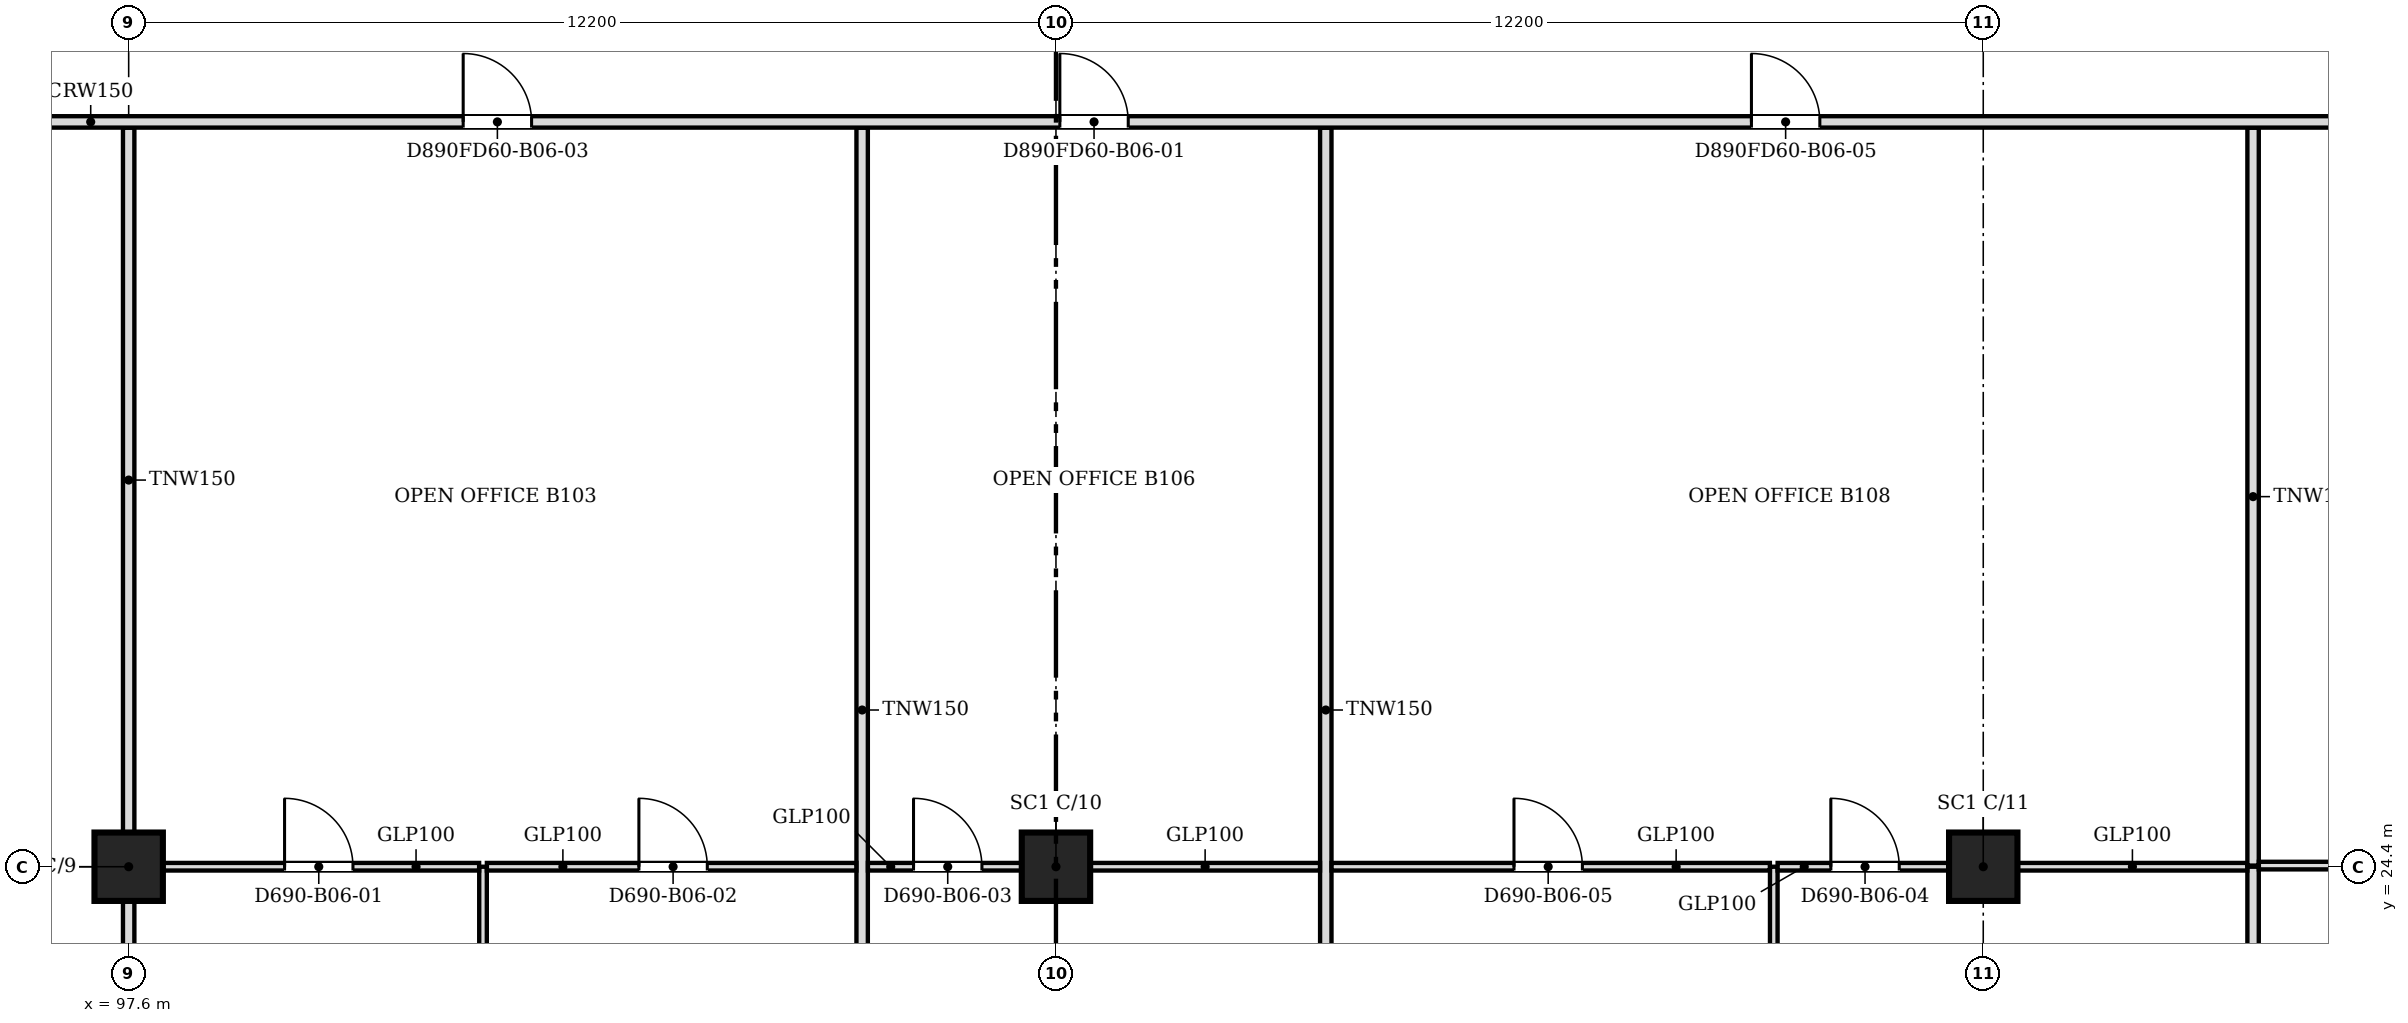
"""IFC4 building model, lengths in metres.
Left out: names, types, materials, properties, quantities, classifications, styles, units other than length and angle.
Written with IfcOpenShell. Run it as: python <this file> out.ifc"""

import sys

from ifc_helpers import new_model, si_unit, direction, frame, frame_2d, origin, origin_2d, place, context, subcontext, project, spatial, rectangle, extrude, source, transform, mapped, element, fill, save


model = new_model("IFC4")
c1 = context("Model", 3, precision=1e-05, world=origin(), true_north=direction((0.0, 1.0)))
c2 = subcontext(c1, "Body", "Model", "MODEL_VIEW")
j1 = project(units=[si_unit("LENGTHUNIT", "METRE"), si_unit("PLANEANGLEUNIT", "RADIAN")], contexts=[c1])
p1 = place(None, origin())
s1 = spatial("IfcSite", under=j1, at=p1, CompositionType="ELEMENT")
p2 = place(p1, origin())
s2 = spatial("IfcBuilding", under=s1, at=p2, CompositionType="ELEMENT")
p3 = place(p2, frame((0.0, 0.0, 60.0)))
s3 = spatial("IfcBuildingStorey", under=s2, at=p3, CompositionType="ELEMENT", Elevation=60.0)
for number, where, z_axis, x_axis in (
    (1, (97.6, 24.4, 0.0), (0.0, 0.0, 1.0), (1.0, 0.0, 0.0)),
    (2, (109.8, 24.4, 0.0), (0.0, 0.0, 1.0), (1.0, 0.0, 0.0)),
    (3, (122.0, 24.4, 0.0), (0.0, 0.0, 1.0), (1.0, 0.0, 0.0)),
):
    element("IfcColumn", number, at=place(p3, frame(where, z_axis=z_axis, x_axis=x_axis)), inside=s3, PredefinedType="COLUMN", context=c2, shape_type="SweptSolid", body=[
        extrude(rectangle(XDim=0.9, YDim=0.9, at=origin_2d()), origin(), (0.0, 0.0, 1.0), 3.5),
    ])
p4 = place(p3, frame((97.6, 18.8, 0.0), z_axis=(0.0, 0.0, 1.0), x_axis=(0.0, 1.0, 0.0)))
e4 = element("IfcWall", 4, at=p4, inside=s3, PredefinedType="PARTITIONING", context=c2, shape_type="SweptSolid", body=[
    extrude(rectangle(XDim=5.149, YDim=0.15, at=frame_2d((2.574, 0.0))), origin(), (0.0, 0.0, 1.0), 2.888),
])
p5 = place(p3, frame((102.262, 18.8, 0.0), z_axis=(0.0, 0.0, 1.0), x_axis=(0.0, 1.0, 0.0)))
e5 = element("IfcWall", 5, at=p5, inside=s3, PredefinedType="PARTITIONING", context=c2, shape_type="SweptSolid", body=[
    extrude(rectangle(XDim=5.6, YDim=0.1, at=frame_2d((2.8, 0.0))), origin(), (0.0, 0.0, 1.0), 2.888),
])
for number, where, z_axis, x_axis in (
    (6, (107.25, 18.8, 0.0), (0.0, 0.0, 1.0), (0.0, 1.0, 0.0)),
    (7, (113.35, 18.8, 0.0), (0.0, 0.0, 1.0), (0.0, 1.0, 0.0)),
):
    element("IfcWall", number, at=place(p3, frame(where, z_axis=z_axis, x_axis=x_axis)), inside=s3, PredefinedType="PARTITIONING", context=c2, shape_type="SweptSolid", body=[
        extrude(rectangle(XDim=15.324, YDim=0.15, at=frame_2d((7.662, 0.0))), origin(), (0.0, 0.0, 1.0), 2.888),
    ])
p6 = place(p3, frame((119.244, 18.8, 0.0), z_axis=(0.0, 0.0, 1.0), x_axis=(0.0, 1.0, 0.0)))
e8 = element("IfcWall", 8, at=p6, inside=s3, PredefinedType="PARTITIONING", context=c2, shape_type="SweptSolid", body=[
    extrude(rectangle(XDim=5.6, YDim=0.1, at=frame_2d((2.8, 0.0))), origin(), (0.0, 0.0, 1.0), 2.888),
])
p7 = place(p3, frame((125.55, 18.8, 0.0), z_axis=(0.0, 0.0, 1.0), x_axis=(0.0, 1.0, 0.0)))
e9 = element("IfcWall", 9, at=p7, inside=s3, PredefinedType="PARTITIONING", context=c2, shape_type="SweptSolid", body=[
    extrude(rectangle(XDim=5.6, YDim=0.15, at=frame_2d((2.8, 0.0))), origin(), (0.0, 0.0, 1.0), 2.888),
])
p8 = place(p3, frame((102.211, 24.4, 0.0), z_axis=(0.0, 0.0, 1.0), x_axis=(-1.0, 0.0, 0.0)))
e10 = element("IfcWall", 10, at=p8, inside=s3, PredefinedType="PARTITIONING", context=c2, shape_type="SweptSolid", body=[
    extrude(rectangle(XDim=4.16, YDim=0.1, at=frame_2d((2.08, 0.0))), origin(), (0.0, 0.0, 1.0), 2.888),
])
m1 = source(origin(), c2, "Body", "SweptSolid", [
    extrude(rectangle(XDim=0.9, YDim=2.1, at=frame_2d((0.45, 1.05))), frame((0.0, 0.06, 0.0), z_axis=(0.0, -1.0, 0.0), x_axis=(1.0, 0.0, 0.0)), (0.0, 0.0, 1.0), 0.12),
])
p9 = place(p8, frame((1.66, 0.0, 0.0)))
e11 = element("IfcOpeningElement", 11, at=p9, cuts=e10, PredefinedType="OPENING", context=c2, shape_type="MappedRepresentation", body=[
    mapped(m1, transform((0.0, 0.0, 0.0), scale=1.0)),
])
p10 = place(p3, frame((107.174, 24.4, 0.0), z_axis=(0.0, 0.0, 1.0), x_axis=(-1.0, 0.0, 0.0)))
e12 = element("IfcWall", 12, at=p10, inside=s3, PredefinedType="PARTITIONING", context=c2, shape_type="SweptSolid", body=[
    extrude(rectangle(XDim=4.861, YDim=0.1, at=frame_2d((2.431, 0.0))), origin(), (0.0, 0.0, 1.0), 2.888),
])
p11 = place(p10, frame((1.961, 0.0, 0.0)))
e13 = element("IfcOpeningElement", 13, at=p11, cuts=e12, PredefinedType="OPENING", context=c2, shape_type="MappedRepresentation", body=[
    mapped(m1, transform((0.0, 0.0, 0.0), scale=1.0)),
])
p12 = place(p3, frame((109.349, 24.4, 0.0), z_axis=(0.0, 0.0, 1.0), x_axis=(-1.0, 0.0, 0.0)))
e14 = element("IfcWall", 14, at=p12, inside=s3, PredefinedType="PARTITIONING", context=c2, shape_type="SweptSolid", body=[
    extrude(rectangle(XDim=2.023, YDim=0.1, at=frame_2d((1.012, 0.0))), origin(), (0.0, 0.0, 1.0), 2.888),
])
p13 = place(p12, frame((0.523, 0.0, 0.0)))
e15 = element("IfcOpeningElement", 15, at=p13, cuts=e14, PredefinedType="OPENING", context=c2, shape_type="MappedRepresentation", body=[
    mapped(m1, transform((0.0, 0.0, 0.0), scale=1.0)),
])
p14 = place(p3, frame((110.251, 24.4, 0.0), z_axis=(0.0, 0.0, 1.0), x_axis=(1.0, 0.0, 0.0)))
e16 = element("IfcWall", 16, at=p14, inside=s3, PredefinedType="PARTITIONING", context=c2, shape_type="SweptSolid", body=[
    extrude(rectangle(XDim=3.023, YDim=0.1, at=frame_2d((1.511, 0.0))), origin(), (0.0, 0.0, 1.0), 2.888),
])
p15 = place(p3, frame((119.193, 24.4, 0.0), z_axis=(0.0, 0.0, 1.0), x_axis=(-1.0, 0.0, 0.0)))
e17 = element("IfcWall", 17, at=p15, inside=s3, PredefinedType="PARTITIONING", context=c2, shape_type="SweptSolid", body=[
    extrude(rectangle(XDim=5.767, YDim=0.1, at=frame_2d((2.883, 0.0))), origin(), (0.0, 0.0, 1.0), 2.888),
])
p16 = place(p15, frame((2.467, 0.0, 0.0)))
e18 = element("IfcOpeningElement", 18, at=p16, cuts=e17, PredefinedType="OPENING", context=c2, shape_type="MappedRepresentation", body=[
    mapped(m1, transform((0.0, 0.0, 0.0), scale=1.0)),
])
p17 = place(p3, frame((121.549, 24.4, 0.0), z_axis=(0.0, 0.0, 1.0), x_axis=(-1.0, 0.0, 0.0)))
e19 = element("IfcWall", 19, at=p17, inside=s3, PredefinedType="PARTITIONING", context=c2, shape_type="SweptSolid", body=[
    extrude(rectangle(XDim=2.254, YDim=0.1, at=frame_2d((1.127, 0.0))), origin(), (0.0, 0.0, 1.0), 2.888),
])
p18 = place(p17, frame((0.654, 0.0, 0.0)))
e20 = element("IfcOpeningElement", 20, at=p18, cuts=e19, PredefinedType="OPENING", context=c2, shape_type="MappedRepresentation", body=[
    mapped(m1, transform((0.0, 0.0, 0.0), scale=1.0)),
])
p19 = place(p3, frame((122.451, 24.4, 0.0), z_axis=(0.0, 0.0, 1.0), x_axis=(1.0, 0.0, 0.0)))
e21 = element("IfcWall", 21, at=p19, inside=s3, PredefinedType="PARTITIONING", context=c2, shape_type="SweptSolid", body=[
    extrude(rectangle(XDim=3.023, YDim=0.1, at=frame_2d((1.512, 0.0))), origin(), (0.0, 0.0, 1.0), 2.888),
])
p20 = place(p3, frame((125.55, 24.415, 0.0), z_axis=(0.0, 0.0, 1.0), x_axis=(0.0, 1.0, 0.0)))
e22 = element("IfcWall", 22, at=p20, inside=s3, PredefinedType="PARTITIONING", context=c2, shape_type="SweptSolid", body=[
    extrude(rectangle(XDim=9.709, YDim=0.15, at=frame_2d((4.854, 0.0))), origin(), (0.0, 0.0, 1.0), 2.888),
])
p21 = place(p3, frame((133.67, 24.415, 0.0), z_axis=(0.0, 0.0, 1.0), x_axis=(-1.0, 0.0, 0.0)))
e23 = element("IfcWall", 23, at=p21, inside=s3, PredefinedType="PARTITIONING", context=c2, shape_type="SweptSolid", body=[
    extrude(rectangle(XDim=8.044, YDim=0.1, at=frame_2d((4.022, 0.0))), origin(), (0.0, 0.0, 1.0), 2.888),
])
p22 = place(p21, frame((3.544, 0.0, 0.0)))
e24 = element("IfcOpeningElement", 24, at=p22, cuts=e23, PredefinedType="OPENING", context=c2, shape_type="MappedRepresentation", body=[
    mapped(m1, transform((0.0, 0.0, 0.0), scale=1.0)),
])
p23 = place(p3, frame((97.6, 24.851, 0.0), z_axis=(0.0, 0.0, 1.0), x_axis=(0.0, 1.0, 0.0)))
e25 = element("IfcWall", 25, at=p23, inside=s3, PredefinedType="PARTITIONING", context=c2, shape_type="SweptSolid", body=[
    extrude(rectangle(XDim=9.273, YDim=0.15, at=frame_2d((4.636, 0.0))), origin(), (0.0, 0.0, 1.0), 2.888),
])
p24 = place(p3, frame((133.7, 34.2, 0.0), z_axis=(0.0, 0.0, 1.0), x_axis=(-1.0, 0.0, 0.0)))
e26 = element("IfcWall", 26, at=p24, inside=s3, PredefinedType="PARTITIONING", context=c2, shape_type="SweptSolid", body=[
    extrude(rectangle(XDim=47.8, YDim=0.15, at=frame_2d((23.9, 0.0))), origin(), (0.0, 0.0, 1.0), 2.888),
])
m2 = source(origin(), c2, "Body", "SweptSolid", [
    extrude(rectangle(XDim=0.9, YDim=2.1, at=frame_2d((0.45, 1.05))), frame((0.0, 0.085, 0.0), z_axis=(0.0, -1.0, 0.0), x_axis=(1.0, 0.0, 0.0)), (0.0, 0.0, 1.0), 0.17),
])
p25 = place(p24, frame((22.949, 0.0, 0.0)))
e27 = element("IfcOpeningElement", 27, at=p25, cuts=e26, PredefinedType="OPENING", context=c2, shape_type="MappedRepresentation", body=[
    mapped(m2, transform((0.0, 0.0, 0.0), scale=1.0)),
])
p26 = place(p24, frame((3.649, 0.0, 0.0)))
e28 = element("IfcOpeningElement", 28, at=p26, cuts=e26, PredefinedType="OPENING", context=c2, shape_type="MappedRepresentation", body=[
    mapped(m2, transform((0.0, 0.0, 0.0), scale=1.0)),
])
p27 = place(p24, frame((30.799, 0.0, 0.0)))
e29 = element("IfcOpeningElement", 29, at=p27, cuts=e26, PredefinedType="OPENING", context=c2, shape_type="MappedRepresentation", body=[
    mapped(m2, transform((0.0, 0.0, 0.0), scale=1.0)),
])
p28 = place(p24, frame((41.5, 0.0, 0.0)))
e30 = element("IfcOpeningElement", 30, at=p28, cuts=e26, PredefinedType="OPENING", context=c2, shape_type="MappedRepresentation", body=[
    mapped(m2, transform((0.0, 0.0, 0.0), scale=1.0)),
])
p29 = place(p24, frame((13.85, 0.0, 0.0)))
e31 = element("IfcOpeningElement", 31, at=p29, cuts=e26, PredefinedType="OPENING", context=c2, shape_type="MappedRepresentation", body=[
    mapped(m2, transform((0.0, 0.0, 0.0), scale=1.0)),
])
m3 = source(origin(), c2, "Body", "SweptSolid", [
    extrude(rectangle(XDim=0.9, YDim=2.1, at=frame_2d((0.45, 1.05))), frame((0.0, 0.025, 0.0), z_axis=(0.0, -1.0, 0.0), x_axis=(1.0, 0.0, 0.0)), (0.0, 0.0, 1.0), 0.05),
])
p30 = place(p9, origin())
e32 = element("IfcDoor", 32, at=p30, inside=s3, OperationType="SINGLE_SWING_RIGHT", PredefinedType="DOOR", context=c2, shape_type="MappedRepresentation", body=[
    mapped(m3, transform((0.0, 0.0, 0.0), scale=1.0)),
])
fill(e11, e32)
p31 = place(p11, origin())
e33 = element("IfcDoor", 33, at=p31, inside=s3, OperationType="SINGLE_SWING_RIGHT", PredefinedType="DOOR", context=c2, shape_type="MappedRepresentation", body=[
    mapped(m3, transform((0.0, 0.0, 0.0), scale=1.0)),
])
fill(e13, e33)
p32 = place(p13, origin())
e34 = element("IfcDoor", 34, at=p32, inside=s3, OperationType="SINGLE_SWING_RIGHT", PredefinedType="DOOR", context=c2, shape_type="MappedRepresentation", body=[
    mapped(m3, transform((0.0, 0.0, 0.0), scale=1.0)),
])
fill(e15, e34)
p33 = place(p18, origin())
e35 = element("IfcDoor", 35, at=p33, inside=s3, OperationType="SINGLE_SWING_RIGHT", PredefinedType="DOOR", context=c2, shape_type="MappedRepresentation", body=[
    mapped(m3, transform((0.0, 0.0, 0.0), scale=1.0)),
])
fill(e20, e35)
p34 = place(p16, origin())
e36 = element("IfcDoor", 36, at=p34, inside=s3, OperationType="SINGLE_SWING_RIGHT", PredefinedType="DOOR", context=c2, shape_type="MappedRepresentation", body=[
    mapped(m3, transform((0.0, 0.0, 0.0), scale=1.0)),
])
fill(e18, e36)
p35 = place(p25, origin())
e37 = element("IfcDoor", 37, at=p35, inside=s3, OperationType="SINGLE_SWING_RIGHT", PredefinedType="DOOR", context=c2, shape_type="MappedRepresentation", body=[
    mapped(m3, transform((0.0, 0.0, 0.0), scale=1.0)),
])
fill(e27, e37)
p36 = place(p27, origin())
e38 = element("IfcDoor", 38, at=p36, inside=s3, OperationType="SINGLE_SWING_RIGHT", PredefinedType="DOOR", context=c2, shape_type="MappedRepresentation", body=[
    mapped(m3, transform((0.0, 0.0, 0.0), scale=1.0)),
])
fill(e29, e38)
p37 = place(p29, origin())
e39 = element("IfcDoor", 39, at=p37, inside=s3, OperationType="SINGLE_SWING_RIGHT", PredefinedType="DOOR", context=c2, shape_type="MappedRepresentation", body=[
    mapped(m3, transform((0.0, 0.0, 0.0), scale=1.0)),
])
fill(e31, e39)
save(model, sys.argv[1])
